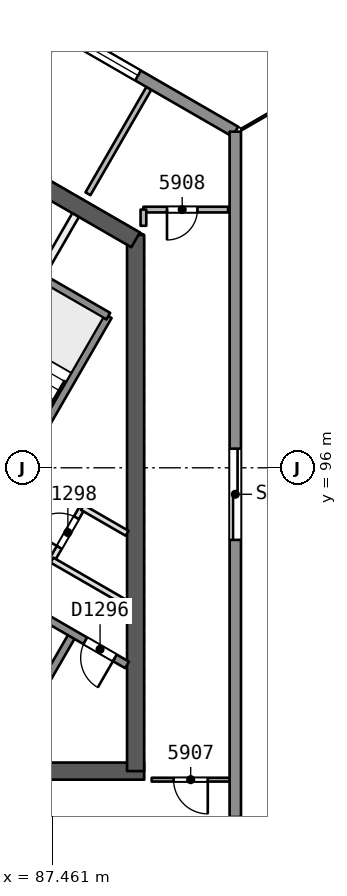
"""IFC4 building model, lengths in metres.
Left out: names, types, materials, properties, quantities, classifications, styles, units other than length and angle.
Written with IfcOpenShell. Run it as: python <this file> out.ifc"""

import sys

from ifc_helpers import new_model, si_unit, direction, frame, frame_2d, origin, origin_2d, place, context, subcontext, project, spatial, rectangle, extrude, element, fill, save


model = new_model("IFC4")
c1 = context("Model", 3, precision=1e-05, world=origin(), true_north=direction((0.0, 1.0)))
c2 = subcontext(c1, "Body", "Model", "MODEL_VIEW")
j1 = project(units=[si_unit("LENGTHUNIT", "METRE"), si_unit("PLANEANGLEUNIT", "RADIAN")], contexts=[c1])
p1 = place(None, origin())
s1 = spatial("IfcSite", under=j1, at=p1, CompositionType="ELEMENT")
p2 = place(p1, origin())
s2 = spatial("IfcBuilding", under=s1, at=p2, CompositionType="ELEMENT")
p3 = place(p2, frame((0.0, 0.0, 239.1)))
s3 = spatial("IfcBuildingStorey", under=s2, at=p3, CompositionType="ELEMENT", Elevation=239.1)
p4 = place(p3, frame((79.63, 88.019, 0.0), z_axis=(0.0, 0.0, 1.0), x_axis=(1.0, 0.0, 0.0)))
e1 = element("IfcWall", 1, at=p4, inside=s3, PredefinedType="SHEAR", context=c2, shape_type="SweptSolid", body=[
    extrude(rectangle(XDim=10.25, YDim=0.45, at=frame_2d((5.125, 0.0))), origin(), (0.0, 0.0, 1.0), 3.7),
])
p5 = place(p4, frame((0.82, 0.0, 0.0)))
e2 = element("IfcOpeningElement", 2, at=p5, cuts=e1, PredefinedType="OPENING", context=c2, shape_type="SweptSolid", body=[
    extrude(rectangle(XDim=1.2, YDim=2.1, at=frame_2d((0.6, 1.05))), frame((0.0, 0.235, 0.0), z_axis=(0.0, -1.0, 0.0), x_axis=(1.0, 0.0, 0.0)), (0.0, 0.0, 1.0), 0.471),
])
p6 = place(p3, frame((89.655, 88.019, 0.0), z_axis=(0.0, 0.0, 1.0), x_axis=(0.0, 1.0, 0.0)))
e3 = element("IfcWall", 3, at=p6, inside=s3, PredefinedType="SHEAR", context=c2, shape_type="SweptSolid", body=[
    extrude(rectangle(XDim=14.108, YDim=0.45, at=frame_2d((7.054, 0.0))), origin(), (0.0, 0.0, 1.0), 3.7),
])
p7 = place(p3, frame((89.655, 101.998, 0.0), z_axis=(0.0, 0.0, 1.0), x_axis=(-0.866042179588, 0.49997094233, 0.0)))
e4 = element("IfcWall", 4, at=p7, inside=s3, PredefinedType="SHEAR", context=c2, shape_type="SweptSolid", body=[
    extrude(rectangle(XDim=3.515, YDim=0.45, at=frame_2d((1.758, 0.0))), origin(), (0.0, 0.0, 1.0), 3.7),
])
p8 = place(p3, frame((91.353, 108.323, 0.0), z_axis=(-0.017607037296, -0.030466109479, 0.999380712447), x_axis=(0.500064653071, 0.865272876704, 0.035187946645)))
e5 = element("IfcColumn", 5, at=p8, inside=s3, PredefinedType="COLUMN", context=c2, shape_type="SweptSolid", body=[
    extrude(rectangle(XDim=1.9, YDim=1.9, at=origin_2d()), origin(), (0.0, 0.0, 1.0), 3.702),
])
p9 = place(p3, frame((92.129, 87.794, 0.0), z_axis=(0.0, 0.0, 1.0), x_axis=(-1.0, 0.0, 0.0)))
e6 = element("IfcWall", 6, at=p9, inside=s3, PredefinedType="PARTITIONING", context=c2, shape_type="SweptSolid", body=[
    extrude(rectangle(XDim=2.05, YDim=0.1, at=frame_2d((1.025, 0.0))), origin(), (0.0, 0.0, 1.0), 3.3),
])
p10 = place(p9, frame((0.575, 0.0, 0.0)))
e7 = element("IfcOpeningElement", 7, at=p10, cuts=e6, PredefinedType="OPENING", context=c2, shape_type="SweptSolid", body=[
    extrude(rectangle(XDim=0.9, YDim=2.1, at=frame_2d((0.45, 1.05))), frame((0.0, 0.061, 0.0), z_axis=(0.0, -1.0, 0.0), x_axis=(1.0, 0.0, 0.0)), (0.0, 0.0, 1.0), 0.121),
])
p11 = place(p3, frame((92.088, 102.794, 0.0), z_axis=(0.0, 0.0, 1.0), x_axis=(-1.0, 0.0, 0.0)))
e8 = element("IfcWall", 8, at=p11, inside=s3, PredefinedType="PARTITIONING", context=c2, shape_type="SweptSolid", body=[
    extrude(rectangle(XDim=2.227, YDim=0.15, at=frame_2d((1.114, 0.0))), origin(), (0.0, 0.0, 1.0), 3.3),
])
p12 = place(p11, frame((0.807, 0.0, 0.0)))
e9 = element("IfcOpeningElement", 9, at=p12, cuts=e8, PredefinedType="OPENING", context=c2, shape_type="SweptSolid", body=[
    extrude(rectangle(XDim=0.8, YDim=2.1, at=frame_2d((0.4, 1.05))), frame((0.0, 0.085, 0.0), z_axis=(0.0, -1.0, 0.0), x_axis=(1.0, 0.0, 0.0)), (0.0, 0.0, 1.0), 0.171),
])
p13 = place(p3, frame((89.861, 102.794, 0.0), z_axis=(0.0, 0.0, 1.0), x_axis=(0.0, -1.0, 0.0)))
e10 = element("IfcWall", 10, at=p13, inside=s3, PredefinedType="PARTITIONING", context=c2, shape_type="SweptSolid", body=[
    extrude(rectangle(XDim=0.426, YDim=0.15, at=frame_2d((0.213, 0.0))), origin(), (0.0, 0.0, 1.0), 3.3),
])
p14 = place(p3, frame((90.004, 105.985, 0.0), z_axis=(0.0, 0.0, 1.0), x_axis=(-0.500023670775, -0.866011737025, 0.0)))
e11 = element("IfcWall", 11, at=p14, inside=s3, PredefinedType="PARTITIONING", context=c2, shape_type="SweptSolid", body=[
    extrude(rectangle(XDim=3.204, YDim=0.15, at=frame_2d((1.602, 0.0))), origin(), (0.0, 0.0, 1.0), 3.3),
])
p15 = place(p3, frame((87.876, 107.386, 0.0), z_axis=(0.0, 0.0, 1.0), x_axis=(0.866029619509, -0.49999269808, 0.0)))
e12 = element("IfcWall", 12, at=p15, inside=s3, PredefinedType="SOLIDWALL", context=c2, shape_type="SweptSolid", body=[
    extrude(rectangle(XDim=5.083, YDim=0.3, at=frame_2d((2.542, 0.0))), origin(), (0.0, 0.0, 1.0), 3.3),
])
p16 = place(p15, frame((0.328, 0.0, 0.9)))
e13 = element("IfcOpeningElement", 13, at=p16, cuts=e12, PredefinedType="OPENING", context=c2, shape_type="SweptSolid", body=[
    extrude(rectangle(XDim=1.8, YDim=1.5, at=frame_2d((0.9, 0.75))), frame((0.0, 0.161, 0.0), z_axis=(0.0, -1.0, 0.0), x_axis=(1.0, 0.0, 0.0)), (0.0, 0.0, 1.0), 0.321),
])
p17 = place(p3, frame((92.279, 104.844, 0.0), z_axis=(0.0, 0.0, 1.0), x_axis=(0.0, -1.0, 0.0)))
e14 = element("IfcWall", 14, at=p17, inside=s3, PredefinedType="SOLIDWALL", context=c2, shape_type="SweptSolid", body=[
    extrude(rectangle(XDim=49.688, YDim=0.3, at=frame_2d((24.844, 0.0))), origin(), (0.0, 0.0, 1.0), 3.3),
])
p18 = place(p17, frame((29.412, 0.0, 0.0)))
e15 = element("IfcOpeningElement", 15, at=p18, cuts=e14, PredefinedType="OPENING", context=c2, shape_type="SweptSolid", body=[
    extrude(rectangle(XDim=2.4, YDim=2.4, at=frame_2d((1.2, 1.2))), frame((0.0, 0.161, 0.0), z_axis=(0.0, -1.0, 0.0), x_axis=(1.0, 0.0, 0.0)), (0.0, 0.0, 1.0), 0.321),
])
p19 = place(p17, frame((38.973, 0.0, 0.0)))
e16 = element("IfcOpeningElement", 16, at=p19, cuts=e14, PredefinedType="OPENING", context=c2, shape_type="SweptSolid", body=[
    extrude(rectangle(XDim=2.4, YDim=2.4, at=frame_2d((1.2, 1.2))), frame((0.0, 0.161, 0.0), z_axis=(0.0, -1.0, 0.0), x_axis=(1.0, 0.0, 0.0)), (0.0, 0.0, 1.0), 0.321),
])
p20 = place(p17, frame((18.032, 0.0, 0.0)))
e17 = element("IfcOpeningElement", 17, at=p20, cuts=e14, PredefinedType="OPENING", context=c2, shape_type="SweptSolid", body=[
    extrude(rectangle(XDim=2.4, YDim=2.4, at=frame_2d((1.2, 1.2))), frame((0.0, 0.161, 0.0), z_axis=(0.0, -1.0, 0.0), x_axis=(1.0, 0.0, 0.0)), (0.0, 0.0, 1.0), 0.321),
])
p21 = place(p17, frame((8.341, 0.0, 0.0)))
e18 = element("IfcOpeningElement", 18, at=p21, cuts=e14, PredefinedType="OPENING", context=c2, shape_type="SweptSolid", body=[
    extrude(rectangle(XDim=2.4, YDim=2.4, at=frame_2d((1.2, 1.2))), frame((0.0, 0.161, 0.0), z_axis=(0.0, -1.0, 0.0), x_axis=(1.0, 0.0, 0.0)), (0.0, 0.0, 1.0), 0.321),
])
p22 = place(p17, frame((25.893, 0.0, 0.9)))
e19 = element("IfcOpeningElement", 19, at=p22, cuts=e14, PredefinedType="OPENING", context=c2, shape_type="SweptSolid", body=[
    extrude(rectangle(XDim=1.8, YDim=1.5, at=frame_2d((0.9, 0.75))), frame((0.0, 0.161, 0.0), z_axis=(0.0, -1.0, 0.0), x_axis=(1.0, 0.0, 0.0)), (0.0, 0.0, 1.0), 0.321),
])
p23 = place(p17, frame((22.307, 0.0, 0.9)))
e20 = element("IfcOpeningElement", 20, at=p23, cuts=e14, PredefinedType="OPENING", context=c2, shape_type="SweptSolid", body=[
    extrude(rectangle(XDim=1.8, YDim=1.5, at=frame_2d((0.9, 0.75))), frame((0.0, 0.161, 0.0), z_axis=(0.0, -1.0, 0.0), x_axis=(1.0, 0.0, 0.0)), (0.0, 0.0, 1.0), 0.321),
])
p24 = place(p3, frame((44.845, 82.542, 0.0), z_axis=(0.0, 0.0, 1.0), x_axis=(0.866025459945, 0.499999902727, 0.0)))
e21 = element("IfcWall", 21, at=p24, inside=s3, PredefinedType="SOLIDWALL", context=c2, shape_type="SweptSolid", body=[
    extrude(rectangle(XDim=49.688, YDim=0.3, at=frame_2d((24.844, 0.0))), origin(), (0.0, 0.0, 1.0), 3.3),
])
p25 = place(p24, frame((23.8, 0.0, 0.0)))
e22 = element("IfcOpeningElement", 22, at=p25, cuts=e21, PredefinedType="OPENING", context=c2, shape_type="SweptSolid", body=[
    extrude(rectangle(XDim=2.4, YDim=2.4, at=frame_2d((1.2, 1.2))), frame((0.0, 0.161, 0.0), z_axis=(0.0, -1.0, 0.0), x_axis=(1.0, 0.0, 0.0)), (0.0, 0.0, 1.0), 0.321),
])
p26 = place(p24, frame((10.243, 0.0, 0.0)))
e23 = element("IfcOpeningElement", 23, at=p26, cuts=e21, PredefinedType="OPENING", context=c2, shape_type="SweptSolid", body=[
    extrude(rectangle(XDim=2.4, YDim=2.4, at=frame_2d((1.2, 1.2))), frame((0.0, 0.161, 0.0), z_axis=(0.0, -1.0, 0.0), x_axis=(1.0, 0.0, 0.0)), (0.0, 0.0, 1.0), 0.321),
])
p27 = place(p24, frame((37.201, 0.0, 0.0)))
e24 = element("IfcOpeningElement", 24, at=p27, cuts=e21, PredefinedType="OPENING", context=c2, shape_type="SweptSolid", body=[
    extrude(rectangle(XDim=2.4, YDim=2.4, at=frame_2d((1.2, 1.2))), frame((0.0, 0.161, 0.0), z_axis=(0.0, -1.0, 0.0), x_axis=(1.0, 0.0, 0.0)), (0.0, 0.0, 1.0), 0.321),
])
p28 = place(p3, frame((86.77, 89.486, 0.0), z_axis=(0.0, 0.0, 1.0), x_axis=(0.499961042966, 0.86604789447, 0.0)))
e25 = element("IfcWall", 25, at=p28, inside=s3, PredefinedType="SOLIDWALL", context=c2, shape_type="SweptSolid", body=[
    extrude(rectangle(XDim=2.48, YDim=0.2, at=frame_2d((1.24, 0.0))), origin(), (0.0, 0.0, 1.0), 3.3),
])
p29 = place(p3, frame((87.454, 93.571, 0.0), z_axis=(0.0, 0.0, 1.0), x_axis=(0.499995408039, 0.866028054938, 0.0)))
e26 = element("IfcWall", 26, at=p29, inside=s3, PredefinedType="PARTITIONING", context=c2, shape_type="SweptSolid", body=[
    extrude(rectangle(XDim=1.6, YDim=0.15, at=frame_2d((0.8, 0.0))), origin(), (0.0, 0.0, 1.0), 3.3),
])
p30 = place(p29, frame((0.387, 0.0, 0.0)))
e27 = element("IfcOpeningElement", 27, at=p30, cuts=e26, PredefinedType="OPENING", context=c2, shape_type="SweptSolid", body=[
    extrude(rectangle(XDim=0.9, YDim=2.1, at=frame_2d((0.45, 1.05))), frame((0.0, 0.085, 0.0), z_axis=(0.0, -1.0, 0.0), x_axis=(1.0, 0.0, 0.0)), (0.0, 0.0, 1.0), 0.171),
])
p31 = place(p3, frame((85.087, 93.321, 0.0), z_axis=(0.0, 0.0, 1.0), x_axis=(0.500019787375, 0.866013979237, 0.0)))
e28 = element("IfcWall", 28, at=p31, inside=s3, PredefinedType="SOLIDWALL", context=c2, shape_type="SweptSolid", body=[
    extrude(rectangle(XDim=7.7, YDim=0.2, at=frame_2d((3.85, 0.0))), origin(), (0.0, 0.0, 1.0), 3.3),
])
p32 = place(p3, frame((87.09, 100.94, 0.0), z_axis=(0.0, 0.0, 1.0), x_axis=(0.500011643316, 0.866018681408, 0.0)))
e29 = element("IfcWall", 29, at=p32, inside=s3, PredefinedType="PARTITIONING", context=c2, shape_type="SweptSolid", body=[
    extrude(rectangle(XDim=1.973, YDim=0.2, at=frame_2d((0.987, 0.0))), origin(), (0.0, 0.0, 1.0), 3.3),
])
p33 = place(p3, frame((89.43, 90.814, 0.0), z_axis=(0.0, 0.0, 1.0), x_axis=(-0.866018983788, 0.500011119594, 0.0)))
e30 = element("IfcWall", 30, at=p33, inside=s3, PredefinedType="SOLIDWALL", context=c2, shape_type="SweptSolid", body=[
    extrude(rectangle(XDim=10.64, YDim=0.2, at=frame_2d((5.32, 0.0))), origin(), (0.0, 0.0, 1.0), 3.3),
])
p34 = place(p33, frame((0.37, 0.0, 0.0)))
e31 = element("IfcOpeningElement", 31, at=p34, cuts=e30, PredefinedType="OPENING", context=c2, shape_type="SweptSolid", body=[
    extrude(rectangle(XDim=0.9, YDim=2.1, at=frame_2d((0.45, 1.05))), frame((0.0, 0.11, 0.0), z_axis=(0.0, -1.0, 0.0), x_axis=(1.0, 0.0, 0.0)), (0.0, 0.0, 1.0), 0.221),
])
p35 = place(p3, frame((89.43, 92.43, 0.0), z_axis=(0.0, 0.0, 1.0), x_axis=(-0.866048373726, 0.499960212783, 0.0)))
e32 = element("IfcWall", 32, at=p35, inside=s3, PredefinedType="PARTITIONING", context=c2, shape_type="SweptSolid", body=[
    extrude(rectangle(XDim=2.281, YDim=0.15, at=frame_2d((1.141, 0.0))), origin(), (0.0, 0.0, 1.0), 3.3),
])
p36 = place(p3, frame((89.43, 94.278, 0.0), z_axis=(0.0, 0.0, 1.0), x_axis=(-0.865987941628, 0.500064880745, 0.0)))
e33 = element("IfcWall", 33, at=p36, inside=s3, PredefinedType="PARTITIONING", context=c2, shape_type="SweptSolid", body=[
    extrude(rectangle(XDim=1.358, YDim=0.15, at=frame_2d((0.679, 0.0))), origin(), (0.0, 0.0, 1.0), 3.3),
])
p37 = place(p3, frame((88.937, 99.99, 0.0), z_axis=(0.0, 0.0, 1.0), x_axis=(-0.866004344652, 0.500036473714, 0.0)))
e34 = element("IfcWall", 34, at=p37, inside=s3, PredefinedType="SOLIDWALL", context=c2, shape_type="SweptSolid", body=[
    extrude(rectangle(XDim=4.15, YDim=0.2, at=frame_2d((2.075, 0.0))), origin(), (0.0, 0.0, 1.0), 3.3),
])
p38 = place(p10, origin())
e35 = element("IfcDoor", 35, at=p38, inside=s3, OperationType="SINGLE_SWING_LEFT", PredefinedType="NOTDEFINED", context=c2, shape_type="SweptSolid", body=[
    extrude(rectangle(XDim=0.9, YDim=2.1, at=frame_2d((0.45, 1.05))), frame((0.0, 0.025, 0.0), z_axis=(0.0, -1.0, 0.0), x_axis=(1.0, 0.0, 0.0)), (0.0, 0.0, 1.0), 0.05),
])
fill(e7, e35)
p39 = place(p12, origin())
e36 = element("IfcDoor", 36, at=p39, inside=s3, OperationType="SINGLE_SWING_RIGHT", PredefinedType="NOTDEFINED", context=c2, shape_type="SweptSolid", body=[
    extrude(rectangle(XDim=0.8, YDim=2.1, at=frame_2d((0.4, 1.05))), frame((0.0, 0.025, 0.0), z_axis=(0.0, -1.0, 0.0), x_axis=(1.0, 0.0, 0.0)), (0.0, 0.0, 1.0), 0.05),
])
fill(e9, e36)
p40 = place(p16, origin())
e37 = element("IfcWindow", 37, at=p40, inside=s3, PartitioningType="SINGLE_PANEL", PredefinedType="WINDOW", context=c2, shape_type="SweptSolid", body=[
    extrude(rectangle(XDim=1.8, YDim=1.5, at=frame_2d((0.9, 0.75))), frame((0.0, 0.03, 0.0), z_axis=(0.0, -1.0, 0.0), x_axis=(1.0, 0.0, 0.0)), (0.0, 0.0, 1.0), 0.06),
])
fill(e13, e37)
p41 = place(p21, origin())
e38 = element("IfcDoor", 38, at=p41, inside=s3, OperationType="SLIDING_TO_RIGHT", PredefinedType="NOTDEFINED", context=c2, shape_type="SweptSolid", body=[
    extrude(rectangle(XDim=2.4, YDim=2.4, at=frame_2d((1.2, 1.2))), frame((0.0, 0.025, 0.0), z_axis=(0.0, -1.0, 0.0), x_axis=(1.0, 0.0, 0.0)), (0.0, 0.0, 1.0), 0.05),
])
fill(e18, e38)
p42 = place(p34, origin())
e39 = element("IfcDoor", 39, at=p42, inside=s3, OperationType="SINGLE_SWING_LEFT", PredefinedType="NOTDEFINED", context=c2, shape_type="SweptSolid", body=[
    extrude(rectangle(XDim=0.9, YDim=2.1, at=frame_2d((0.45, 1.05))), frame((0.0, 0.025, 0.0), z_axis=(0.0, -1.0, 0.0), x_axis=(1.0, 0.0, 0.0)), (0.0, 0.0, 1.0), 0.05),
])
fill(e31, e39)
p43 = place(p30, origin())
e40 = element("IfcDoor", 40, at=p43, inside=s3, OperationType="SINGLE_SWING_LEFT", PredefinedType="NOTDEFINED", context=c2, shape_type="SweptSolid", body=[
    extrude(rectangle(XDim=0.9, YDim=2.1, at=frame_2d((0.45, 1.05))), frame((0.0, 0.025, 0.0), z_axis=(0.0, -1.0, 0.0), x_axis=(1.0, 0.0, 0.0)), (0.0, 0.0, 1.0), 0.05),
])
fill(e27, e40)
save(model, sys.argv[1])
